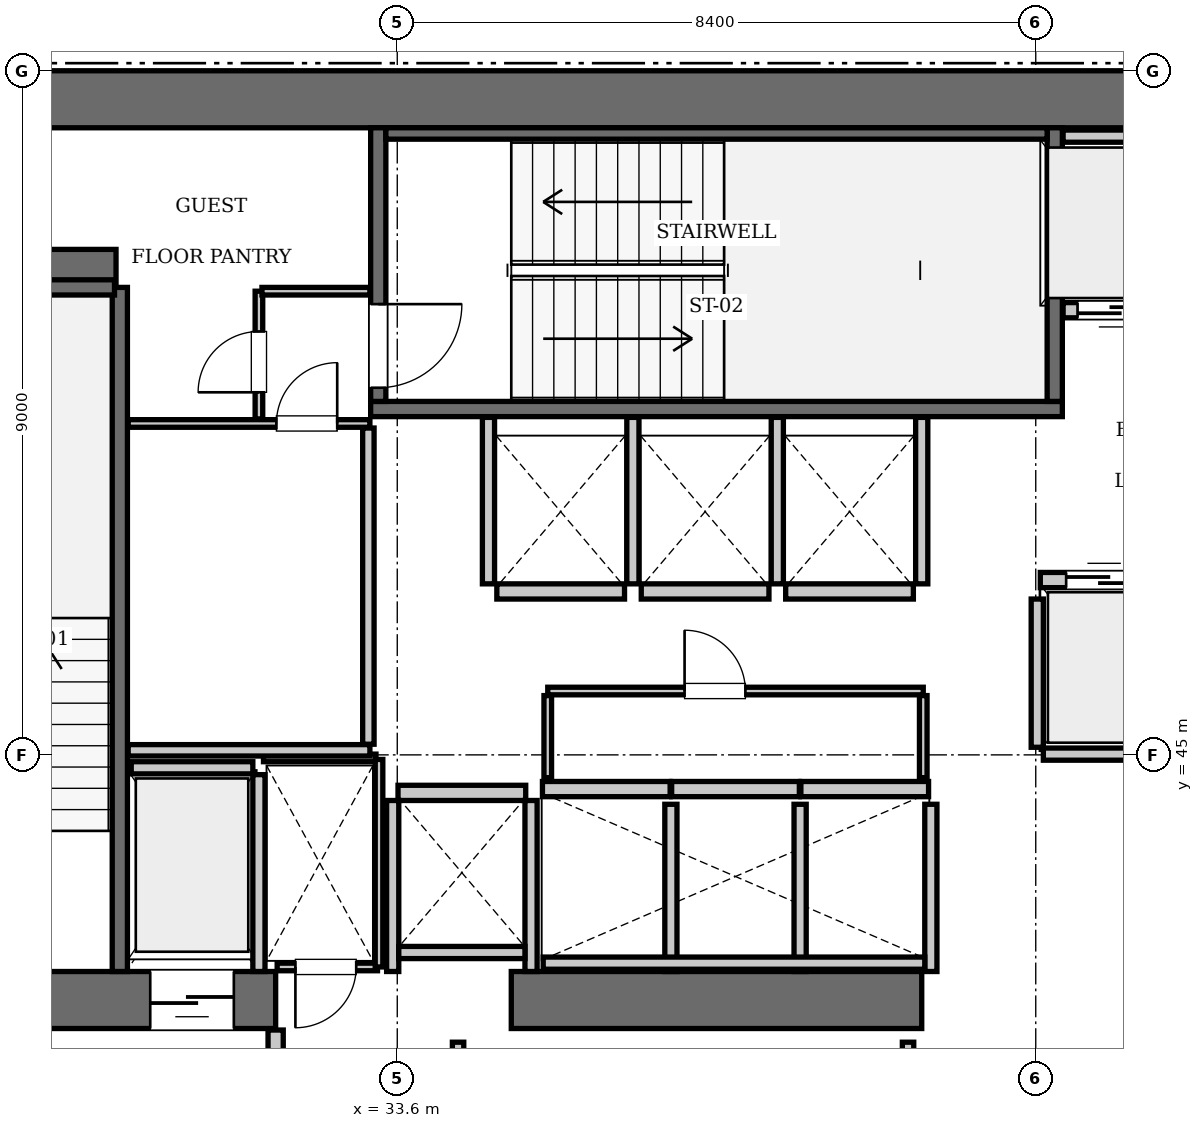
"""IFC4 building model, lengths in metres.
Left out: names, types, materials, properties, quantities, classifications, styles, units other than length and angle.
Written with IfcOpenShell. Run it as: python <this file> out.ifc"""

import sys

from ifc_helpers import new_model, si_unit, direction, frame, frame_2d, origin, place, context, subcontext, project, spatial, rectangle, extrude, element, fill, save


model = new_model("IFC4")
c1 = context("Model", 3, precision=1e-05, world=origin(), true_north=direction((0.0, 1.0)))
c2 = subcontext(c1, "Body", "Model", "MODEL_VIEW")
j1 = project(units=[si_unit("LENGTHUNIT", "METRE"), si_unit("PLANEANGLEUNIT", "RADIAN")], contexts=[c1])
p1 = place(None, origin())
s1 = spatial("IfcSite", under=j1, at=p1, CompositionType="ELEMENT")
p2 = place(p1, origin())
s2 = spatial("IfcBuilding", under=s1, at=p2, CompositionType="ELEMENT")
p3 = place(p2, frame((0.0, 0.0, 150.5)))
s3 = spatial("IfcBuildingStorey", under=s2, at=p3, CompositionType="ELEMENT", Elevation=150.5)
p4 = place(p3, frame((25.2, 53.625, 0.0), z_axis=(0.0, 0.0, 1.0), x_axis=(1.0, 0.0, 0.0)))
e1 = element("IfcWall", 1, at=p4, inside=s3, PredefinedType="SHEAR", context=c2, shape_type="SweptSolid", body=[
    extrude(rectangle(XDim=25.2, YDim=0.75, at=frame_2d((12.6, 0.0))), origin(), (0.0, 0.0, 1.0), 3.85),
])
p5 = place(p3, frame((25.2, 41.775, 0.0), z_axis=(0.0, 0.0, 1.0), x_axis=(1.0, 0.0, 0.0)))
e2 = element("IfcWall", 2, at=p5, inside=s3, PredefinedType="SHEAR", context=c2, shape_type="SweptSolid", body=[
    extrude(rectangle(XDim=6.8, YDim=0.75, at=frame_2d((3.4, 0.0))), origin(), (0.0, 0.0, 1.0), 3.85),
])
p6 = place(p5, frame((1.65, 0.0, 0.0)))
e3 = element("IfcOpeningElement", 3, at=p6, cuts=e2, PredefinedType="OPENING", context=c2, shape_type="SweptSolid", body=[
    extrude(rectangle(XDim=1.15, YDim=2.15, at=frame_2d((0.575, 1.075))), frame((0.0, 0.385, 0.0), z_axis=(0.0, -1.0, 0.0), x_axis=(1.0, 0.0, 0.0)), (0.0, 0.0, 1.0), 0.77),
])
p7 = place(p5, frame((5.15, 0.0, 0.0)))
e4 = element("IfcOpeningElement", 4, at=p7, cuts=e2, PredefinedType="OPENING", context=c2, shape_type="SweptSolid", body=[
    extrude(rectangle(XDim=1.1, YDim=2.2, at=frame_2d((0.55, 1.1))), frame((0.0, 0.385, 0.0), z_axis=(0.0, -1.0, 0.0), x_axis=(1.0, 0.0, 0.0)), (0.0, 0.0, 1.0), 0.77),
])
p8 = place(p3, frame((35.1, 41.775, 0.0), z_axis=(0.0, 0.0, 1.0), x_axis=(1.0, 0.0, 0.0)))
e5 = element("IfcWall", 5, at=p8, inside=s3, PredefinedType="SHEAR", context=c2, shape_type="SweptSolid", body=[
    extrude(rectangle(XDim=5.4, YDim=0.75, at=frame_2d((2.7, 0.0))), origin(), (0.0, 0.0, 1.0), 3.85),
])
p9 = place(p3, frame((25.95, 51.4, 0.0), z_axis=(0.0, 0.0, 1.0), x_axis=(1.0, 0.0, 0.0)))
e6 = element("IfcWall", 6, at=p9, inside=s3, PredefinedType="SHEAR", context=c2, shape_type="SweptSolid", body=[
    extrude(rectangle(XDim=3.95, YDim=0.5, at=frame_2d((1.975, 0.0))), origin(), (0.0, 0.0, 1.0), 3.85),
])
p10 = place(p3, frame((29.95, 42.15, 0.0), z_axis=(0.0, 0.0, 1.0), x_axis=(0.0, 1.0, 0.0)))
e7 = element("IfcWall", 7, at=p10, inside=s3, PredefinedType="SOLIDWALL", context=c2, shape_type="SweptSolid", body=[
    extrude(rectangle(XDim=9.0, YDim=0.2, at=frame_2d((4.5, 0.0))), origin(), (0.0, 0.0, 1.0), 3.61),
])
p11 = place(p3, frame((26.38, 51.15, 0.0), z_axis=(0.0, 0.0, 1.0), x_axis=(1.0, 0.0, 0.0)))
e8 = element("IfcWall", 8, at=p11, inside=s3, PredefinedType="SOLIDWALL", context=c2, shape_type="SweptSolid", body=[
    extrude(rectangle(XDim=3.5, YDim=0.2, at=frame_2d((1.75, 0.0))), origin(), (0.0, 0.0, 1.0), 3.61),
])
p12 = place(p3, frame((33.25, 49.55, 0.0), z_axis=(0.0, 0.0, 1.0), x_axis=(1.0, 0.0, 0.0)))
e9 = element("IfcWall", 9, at=p12, inside=s3, PredefinedType="SOLIDWALL", context=c2, shape_type="SweptSolid", body=[
    extrude(rectangle(XDim=9.1, YDim=0.2, at=frame_2d((4.55, 0.0))), origin(), (0.0, 0.0, 1.0), 3.61),
])
p13 = place(p3, frame((42.25, 49.65, 0.0), z_axis=(0.0, 0.0, 1.0), x_axis=(0.0, 1.0, 0.0)))
e10 = element("IfcWall", 10, at=p13, inside=s3, PredefinedType="SOLIDWALL", context=c2, shape_type="SweptSolid", body=[
    extrude(rectangle(XDim=3.6, YDim=0.2, at=frame_2d((1.8, 0.0))), origin(), (0.0, 0.0, 1.0), 3.61),
])
p14 = place(p3, frame((33.35, 49.65, 0.0), z_axis=(0.0, 0.0, 1.0), x_axis=(0.0, 1.0, 0.0)))
e11 = element("IfcWall", 11, at=p14, inside=s3, PredefinedType="SOLIDWALL", context=c2, shape_type="SweptSolid", body=[
    extrude(rectangle(XDim=3.6, YDim=0.2, at=frame_2d((1.8, 0.0))), origin(), (0.0, 0.0, 1.0), 3.61),
])
p15 = place(p14, frame((0.18, 0.0, 0.0)))
e12 = element("IfcOpeningElement", 12, at=p15, cuts=e11, PredefinedType="OPENING", context=c2, shape_type="SweptSolid", body=[
    extrude(rectangle(XDim=1.1, YDim=2.15, at=frame_2d((0.55, 1.075))), frame((0.0, 0.11, 0.0), z_axis=(0.0, -1.0, 0.0), x_axis=(1.0, 0.0, 0.0)), (0.0, 0.0, 1.0), 0.22),
])
p16 = place(p3, frame((33.45, 53.175, 0.0), z_axis=(0.0, 0.0, 1.0), x_axis=(1.0, 0.0, 0.0)))
e13 = element("IfcWall", 13, at=p16, inside=s3, PredefinedType="SOLIDWALL", context=c2, shape_type="SweptSolid", body=[
    extrude(rectangle(XDim=8.7, YDim=0.15, at=frame_2d((4.35, 0.0))), origin(), (0.0, 0.0, 1.0), 3.61),
])
p17 = place(p3, frame((42.06, 47.3, 0.0), z_axis=(0.0, 0.0, 1.0), x_axis=(1.0, 0.0, 0.0)))
e14 = element("IfcWall", 14, at=p17, inside=s3, PredefinedType="SOLIDWALL", context=c2, shape_type="SweptSolid", body=[
    extrude(rectangle(XDim=1.68, YDim=0.2, at=frame_2d((0.84, 0.0))), origin(), (0.0, 0.0, 1.0), 3.61),
])
p18 = place(p17, frame((0.34, 0.0, 0.0)))
e15 = element("IfcOpeningElement", 15, at=p18, cuts=e14, PredefinedType="OPENING", context=c2, shape_type="SweptSolid", body=[
    extrude(rectangle(XDim=1.0, YDim=2.15, at=frame_2d((0.5, 1.075))), frame((0.0, 0.11, 0.0), z_axis=(0.0, -1.0, 0.0), x_axis=(1.0, 0.0, 0.0)), (0.0, 0.0, 1.0), 0.22),
])
p19 = place(p3, frame((42.36, 50.85, 0.0), z_axis=(0.0, 0.0, 1.0), x_axis=(1.0, 0.0, 0.0)))
e16 = element("IfcWall", 16, at=p19, inside=s3, PredefinedType="SOLIDWALL", context=c2, shape_type="SweptSolid", body=[
    extrude(rectangle(XDim=1.38, YDim=0.2, at=frame_2d((0.69, 0.0))), origin(), (0.0, 0.0, 1.0), 3.61),
])
p20 = place(p19, frame((0.19, 0.0, 0.0)))
e17 = element("IfcOpeningElement", 17, at=p20, cuts=e16, PredefinedType="OPENING", context=c2, shape_type="SweptSolid", body=[
    extrude(rectangle(XDim=1.0, YDim=2.15, at=frame_2d((0.5, 1.075))), frame((0.0, 0.11, 0.0), z_axis=(0.0, -1.0, 0.0), x_axis=(1.0, 0.0, 0.0)), (0.0, 0.0, 1.0), 0.22),
])
for number, where, z_axis, x_axis in (
    (18, (35.51, 44.55, 0.0), (0.0, 0.0, 1.0), (1.0, 0.0, 0.0)),
    (19, (37.21, 44.55, 0.0), (0.0, 0.0, 1.0), (1.0, 0.0, 0.0)),
):
    element("IfcWall", number, at=place(p3, frame(where, z_axis=z_axis, x_axis=x_axis)), inside=s3, PredefinedType="SOLIDWALL", context=c2, shape_type="SweptSolid", body=[
        extrude(rectangle(XDim=1.68, YDim=0.2, at=frame_2d((0.84, 0.0))), origin(), (0.0, 0.0, 1.0), 3.61),
    ])
for number, where, z_axis, x_axis in (
    (20, (38.91, 44.55, 0.0), (0.0, 0.0, 1.0), (1.0, 0.0, 0.0)),
    (21, (34.91, 47.15, 0.0), (0.0, 0.0, 1.0), (1.0, 0.0, 0.0)),
):
    element("IfcWall", number, at=place(p3, frame(where, z_axis=z_axis, x_axis=x_axis)), inside=s3, PredefinedType="SOLIDWALL", context=c2, shape_type="SweptSolid", body=[
        extrude(rectangle(XDim=1.68, YDim=0.2, at=frame_2d((0.84, 0.0))), origin(), (0.0, 0.0, 1.0), 3.61),
    ])
for number, where, z_axis, x_axis in (
    (22, (36.81, 47.15, 0.0), (0.0, 0.0, 1.0), (1.0, 0.0, 0.0)),
    (23, (38.71, 47.15, 0.0), (0.0, 0.0, 1.0), (1.0, 0.0, 0.0)),
    (24, (33.61, 44.5, 0.0), (0.0, 0.0, 1.0), (1.0, 0.0, 0.0)),
):
    element("IfcWall", number, at=place(p3, frame(where, z_axis=z_axis, x_axis=x_axis)), inside=s3, PredefinedType="SOLIDWALL", context=c2, shape_type="SweptSolid", body=[
        extrude(rectangle(XDim=1.68, YDim=0.2, at=frame_2d((0.84, 0.0))), origin(), (0.0, 0.0, 1.0), 3.61),
    ])
p21 = place(p3, frame((30.1, 44.83, 0.0), z_axis=(0.0, 0.0, 1.0), x_axis=(1.0, 0.0, 0.0)))
e25 = element("IfcWall", 25, at=p21, inside=s3, PredefinedType="SOLIDWALL", context=c2, shape_type="SweptSolid", body=[
    extrude(rectangle(XDim=1.6, YDim=0.16, at=frame_2d((0.8, 0.0))), origin(), (0.0, 0.0, 1.0), 3.61),
])
p22 = place(p3, frame((31.78, 42.15, 0.0), z_axis=(0.0, 0.0, 1.0), x_axis=(0.0, 1.0, 0.0)))
e26 = element("IfcWall", 26, at=p22, inside=s3, PredefinedType="SOLIDWALL", context=c2, shape_type="SweptSolid", body=[
    extrude(rectangle(XDim=2.59, YDim=0.16, at=frame_2d((1.295, 0.0))), origin(), (0.0, 0.0, 1.0), 3.61),
])
p23 = place(p3, frame((42.02, 45.1, 0.0), z_axis=(0.0, 0.0, 1.0), x_axis=(0.0, 1.0, 0.0)))
e27 = element("IfcWall", 27, at=p23, inside=s3, PredefinedType="SOLIDWALL", context=c2, shape_type="SweptSolid", body=[
    extrude(rectangle(XDim=1.95, YDim=0.16, at=frame_2d((0.975, 0.0))), origin(), (0.0, 0.0, 1.0), 3.61),
])
p24 = place(p3, frame((42.1, 45.01, 0.0), z_axis=(0.0, 0.0, 1.0), x_axis=(1.0, 0.0, 0.0)))
e28 = element("IfcWall", 28, at=p24, inside=s3, PredefinedType="SOLIDWALL", context=c2, shape_type="SweptSolid", body=[
    extrude(rectangle(XDim=3.45, YDim=0.16, at=frame_2d((1.725, 0.0))), origin(), (0.0, 0.0, 1.0), 3.61),
])
p25 = place(p3, frame((42.36, 53.14, 0.0), z_axis=(0.0, 0.0, 1.0), x_axis=(1.0, 0.0, 0.0)))
e29 = element("IfcWall", 29, at=p25, inside=s3, PredefinedType="SOLIDWALL", context=c2, shape_type="SweptSolid", body=[
    extrude(rectangle(XDim=3.14, YDim=0.16, at=frame_2d((1.57, 0.0))), origin(), (0.0, 0.0, 1.0), 3.61),
])
for number, where, z_axis, x_axis in (
    (30, (37.2, 42.15, 0.0), (0.0, 0.0, 1.0), (0.0, 1.0, 0.0)),
    (31, (38.9, 42.15, 0.0), (0.0, 0.0, 1.0), (0.0, 1.0, 0.0)),
    (32, (40.62, 42.15, 0.0), (0.0, 0.0, 1.0), (0.0, 1.0, 0.0)),
):
    element("IfcWall", number, at=place(p3, frame(where, z_axis=z_axis, x_axis=x_axis)), inside=s3, PredefinedType="SOLIDWALL", context=c2, shape_type="SweptSolid", body=[
        extrude(rectangle(XDim=2.2, YDim=0.16, at=frame_2d((1.1, 0.0))), origin(), (0.0, 0.0, 1.0), 3.61),
    ])
p26 = place(p3, frame((35.52, 42.26, 0.0), z_axis=(0.0, 0.0, 1.0), x_axis=(1.0, 0.0, 0.0)))
e33 = element("IfcWall", 33, at=p26, inside=s3, PredefinedType="SOLIDWALL", context=c2, shape_type="SweptSolid", body=[
    extrude(rectangle(XDim=5.02, YDim=0.16, at=frame_2d((2.51, 0.0))), origin(), (0.0, 0.0, 1.0), 3.61),
])
for number, where, z_axis, x_axis in (
    (34, (34.8, 47.25, 0.0), (0.0, 0.0, 1.0), (0.0, 1.0, 0.0)),
    (35, (36.7, 47.25, 0.0), (0.0, 0.0, 1.0), (0.0, 1.0, 0.0)),
    (36, (38.6, 47.25, 0.0), (0.0, 0.0, 1.0), (0.0, 1.0, 0.0)),
    (37, (40.5, 47.25, 0.0), (0.0, 0.0, 1.0), (0.0, 1.0, 0.0)),
):
    element("IfcWall", number, at=place(p3, frame(where, z_axis=z_axis, x_axis=x_axis)), inside=s3, PredefinedType="SOLIDWALL", context=c2, shape_type="SweptSolid", body=[
        extrude(rectangle(XDim=2.19, YDim=0.16, at=frame_2d((1.095, 0.0))), origin(), (0.0, 0.0, 1.0), 3.61),
    ])
for number, where, z_axis, x_axis in (
    (38, (33.54, 42.15, 0.0), (0.0, 0.0, 1.0), (0.0, 1.0, 0.0)),
    (39, (35.36, 42.15, 0.0), (0.0, 0.0, 1.0), (0.0, 1.0, 0.0)),
):
    element("IfcWall", number, at=place(p3, frame(where, z_axis=z_axis, x_axis=x_axis)), inside=s3, PredefinedType="SOLIDWALL", context=c2, shape_type="SweptSolid", body=[
        extrude(rectangle(XDim=2.25, YDim=0.16, at=frame_2d((1.125, 0.0))), origin(), (0.0, 0.0, 1.0), 3.61),
    ])
p27 = place(p3, frame((33.62, 42.4, 0.0), z_axis=(0.0, 0.0, 1.0), x_axis=(1.0, 0.0, 0.0)))
e40 = element("IfcWall", 40, at=p27, inside=s3, PredefinedType="SOLIDWALL", context=c2, shape_type="SweptSolid", body=[
    extrude(rectangle(XDim=1.66, YDim=0.16, at=frame_2d((0.83, 0.0))), origin(), (0.0, 0.0, 1.0), 3.61),
])
p28 = place(p3, frame((32.0, 38.31, 0.0), z_axis=(0.0, 0.0, 1.0), x_axis=(0.0, 1.0, 0.0)))
e41 = element("IfcWall", 41, at=p28, inside=s3, PredefinedType="PARTITIONING", context=c2, shape_type="SweptSolid", body=[
    extrude(rectangle(XDim=3.07, YDim=0.2, at=frame_2d((1.535, 0.0))), origin(), (0.0, 0.0, 1.0), 3.61),
])
p29 = place(p3, frame((32.02, 42.21, 0.0), z_axis=(0.0, 0.0, 1.0), x_axis=(1.0, 0.0, 0.0)))
e42 = element("IfcWall", 42, at=p29, inside=s3, PredefinedType="PARTITIONING", context=c2, shape_type="SweptSolid", body=[
    extrude(rectangle(XDim=1.32, YDim=0.1, at=frame_2d((0.66, 0.0))), origin(), (0.0, 0.0, 1.0), 3.61),
])
p30 = place(p29, frame((0.24, 0.0, 0.0)))
e43 = element("IfcOpeningElement", 43, at=p30, cuts=e42, PredefinedType="OPENING", context=c2, shape_type="SweptSolid", body=[
    extrude(rectangle(XDim=0.8, YDim=2.05, at=frame_2d((0.4, 1.025))), frame((0.0, 0.06, 0.0), z_axis=(0.0, -1.0, 0.0), x_axis=(1.0, 0.0, 0.0)), (0.0, 0.0, 1.0), 0.12),
])
p31 = place(p3, frame((31.84, 44.96, 0.0), z_axis=(0.0, 0.0, 1.0), x_axis=(1.0, 0.0, 0.0)))
e44 = element("IfcWall", 44, at=p31, inside=s3, PredefinedType="PARTITIONING", context=c2, shape_type="SweptSolid", body=[
    extrude(rectangle(XDim=1.48, YDim=0.1, at=frame_2d((0.74, 0.0))), origin(), (0.0, 0.0, 1.0), 3.61),
])
p32 = place(p3, frame((33.36, 42.21, 0.0), z_axis=(0.0, 0.0, 1.0), x_axis=(0.0, 1.0, 0.0)))
e45 = element("IfcWall", 45, at=p32, inside=s3, PredefinedType="PARTITIONING", context=c2, shape_type="SweptSolid", body=[
    extrude(rectangle(XDim=2.73, YDim=0.1, at=frame_2d((1.365, 0.0))), origin(), (0.0, 0.0, 1.0), 3.61),
])
p33 = place(p3, frame((35.58, 45.84, 0.0), z_axis=(0.0, 0.0, 1.0), x_axis=(1.0, 0.0, 0.0)))
e46 = element("IfcWall", 46, at=p33, inside=s3, PredefinedType="PARTITIONING", context=c2, shape_type="SweptSolid", body=[
    extrude(rectangle(XDim=4.94, YDim=0.1, at=frame_2d((2.47, 0.0))), origin(), (0.0, 0.0, 1.0), 3.61),
])
p34 = place(p33, frame((1.8, 0.0, 0.0)))
e47 = element("IfcOpeningElement", 47, at=p34, cuts=e46, PredefinedType="OPENING", context=c2, shape_type="SweptSolid", body=[
    extrude(rectangle(XDim=0.8, YDim=2.05, at=frame_2d((0.4, 1.025))), frame((0.0, 0.06, 0.0), z_axis=(0.0, -1.0, 0.0), x_axis=(1.0, 0.0, 0.0)), (0.0, 0.0, 1.0), 0.12),
])
for number, where, z_axis, x_axis in (
    (48, (35.58, 44.7, 0.0), (0.0, 0.0, 1.0), (0.0, 1.0, 0.0)),
    (49, (40.52, 44.7, 0.0), (0.0, 0.0, 1.0), (0.0, 1.0, 0.0)),
):
    element("IfcWall", number, at=place(p3, frame(where, z_axis=z_axis, x_axis=x_axis)), inside=s3, PredefinedType="PARTITIONING", context=c2, shape_type="SweptSolid", body=[
        extrude(rectangle(XDim=1.08, YDim=0.1, at=frame_2d((0.54, 0.0))), origin(), (0.0, 0.0, 1.0), 3.61),
    ])
p35 = place(p3, frame((30.06, 45.06, 0.0), z_axis=(0.0, 0.0, 1.0), x_axis=(1.0, 0.0, 0.0)))
e50 = element("IfcWall", 50, at=p35, inside=s3, PredefinedType="PARTITIONING", context=c2, shape_type="SweptSolid", body=[
    extrude(rectangle(XDim=3.18, YDim=0.15, at=frame_2d((1.59, 0.0))), origin(), (0.0, 0.0, 1.0), 3.61),
])
p36 = place(p3, frame((33.22, 45.14, 0.0), z_axis=(0.0, 0.0, 1.0), x_axis=(0.0, 1.0, 0.0)))
e51 = element("IfcWall", 51, at=p36, inside=s3, PredefinedType="PARTITIONING", context=c2, shape_type="SweptSolid", body=[
    extrude(rectangle(XDim=4.16, YDim=0.15, at=frame_2d((2.08, 0.0))), origin(), (0.0, 0.0, 1.0), 3.61),
])
p37 = place(p3, frame((30.06, 49.36, 0.0), z_axis=(0.0, 0.0, 1.0), x_axis=(1.0, 0.0, 0.0)))
e52 = element("IfcWall", 52, at=p37, inside=s3, PredefinedType="PARTITIONING", context=c2, shape_type="SweptSolid", body=[
    extrude(rectangle(XDim=3.18, YDim=0.1, at=frame_2d((1.59, 0.0))), origin(), (0.0, 0.0, 1.0), 3.61),
])
p38 = place(p37, frame((1.95, 0.0, 0.0)))
e53 = element("IfcOpeningElement", 53, at=p38, cuts=e52, PredefinedType="OPENING", context=c2, shape_type="SweptSolid", body=[
    extrude(rectangle(XDim=0.8, YDim=2.05, at=frame_2d((0.4, 1.025))), frame((0.0, 0.06, 0.0), z_axis=(0.0, -1.0, 0.0), x_axis=(1.0, 0.0, 0.0)), (0.0, 0.0, 1.0), 0.12),
])
p39 = place(p3, frame((31.78, 49.42, 0.0), z_axis=(0.0, 0.0, 1.0), x_axis=(0.0, 1.0, 0.0)))
e54 = element("IfcWall", 54, at=p39, inside=s3, PredefinedType="PARTITIONING", context=c2, shape_type="SweptSolid", body=[
    extrude(rectangle(XDim=1.68, YDim=0.1, at=frame_2d((0.84, 0.0))), origin(), (0.0, 0.0, 1.0), 3.61),
])
p40 = place(p39, frame((0.35, 0.0, 0.0)))
e55 = element("IfcOpeningElement", 55, at=p40, cuts=e54, PredefinedType="OPENING", context=c2, shape_type="SweptSolid", body=[
    extrude(rectangle(XDim=0.8, YDim=2.05, at=frame_2d((0.4, 1.025))), frame((0.0, 0.06, 0.0), z_axis=(0.0, -1.0, 0.0), x_axis=(1.0, 0.0, 0.0)), (0.0, 0.0, 1.0), 0.12),
])
p41 = place(p3, frame((31.82, 51.1, 0.0), z_axis=(0.0, 0.0, 1.0), x_axis=(1.0, 0.0, 0.0)))
e56 = element("IfcWall", 56, at=p41, inside=s3, PredefinedType="PARTITIONING", context=c2, shape_type="SweptSolid", body=[
    extrude(rectangle(XDim=1.42, YDim=0.1, at=frame_2d((0.71, 0.0))), origin(), (0.0, 0.0, 1.0), 3.61),
])
for number, where, z_axis, x_axis in (
    (57, (34.4, 38.38, 0.0), (0.0, 0.0, 1.0), (0.0, 1.0, 0.0)),
    (58, (40.32, 38.38, 0.0), (0.0, 0.0, 1.0), (0.0, 1.0, 0.0)),
):
    element("IfcWall", number, at=place(p3, frame(where, z_axis=z_axis, x_axis=x_axis)), inside=s3, PredefinedType="PARTITIONING", context=c2, shape_type="SweptSolid", body=[
        extrude(rectangle(XDim=2.84, YDim=0.15, at=frame_2d((1.42, 0.0))), origin(), (0.0, 0.0, 1.0), 3.61),
    ])
p42 = place(p15, frame((1.1, 0.0, 0.0), z_axis=(0.0, 0.0, 1.0), x_axis=(-1.0, 0.0, 0.0)))
e59 = element("IfcDoor", 59, at=p42, inside=s3, OperationType="SINGLE_SWING_LEFT", PredefinedType="DOOR", context=c2, shape_type="SweptSolid", body=[
    extrude(rectangle(XDim=1.1, YDim=2.15, at=frame_2d((0.55, 1.075))), frame((0.0, 0.025, 0.0), z_axis=(0.0, -1.0, 0.0), x_axis=(1.0, 0.0, 0.0)), (0.0, 0.0, 1.0), 0.05),
])
fill(e12, e59)
p43 = place(p18, origin())
e60 = element("IfcDoor", 60, at=p43, inside=s3, OperationType="SLIDING_TO_LEFT", PredefinedType="DOOR", context=c2, shape_type="SweptSolid", body=[
    extrude(rectangle(XDim=1.0, YDim=2.15, at=frame_2d((0.5, 1.075))), frame((0.0, 0.025, 0.0), z_axis=(0.0, -1.0, 0.0), x_axis=(1.0, 0.0, 0.0)), (0.0, 0.0, 1.0), 0.05),
])
fill(e15, e60)
p44 = place(p20, frame((1.0, 0.0, 0.0), z_axis=(0.0, 0.0, 1.0), x_axis=(-1.0, 0.0, 0.0)))
e61 = element("IfcDoor", 61, at=p44, inside=s3, OperationType="SLIDING_TO_LEFT", PredefinedType="DOOR", context=c2, shape_type="SweptSolid", body=[
    extrude(rectangle(XDim=1.0, YDim=2.15, at=frame_2d((0.5, 1.075))), frame((0.0, 0.025, 0.0), z_axis=(0.0, -1.0, 0.0), x_axis=(1.0, 0.0, 0.0)), (0.0, 0.0, 1.0), 0.05),
])
fill(e17, e61)
p45 = place(p7, frame((1.1, 0.0, 0.0), z_axis=(0.0, 0.0, 1.0), x_axis=(-1.0, 0.0, 0.0)))
e62 = element("IfcDoor", 62, at=p45, inside=s3, OperationType="SLIDING_TO_LEFT", PredefinedType="DOOR", context=c2, shape_type="SweptSolid", body=[
    extrude(rectangle(XDim=1.1, YDim=2.2, at=frame_2d((0.55, 1.1))), frame((0.0, 0.025, 0.0), z_axis=(0.0, -1.0, 0.0), x_axis=(1.0, 0.0, 0.0)), (0.0, 0.0, 1.0), 0.05),
])
fill(e4, e62)
p46 = place(p30, frame((0.8, 0.0, 0.0), z_axis=(0.0, 0.0, 1.0), x_axis=(-1.0, 0.0, 0.0)))
e63 = element("IfcDoor", 63, at=p46, inside=s3, OperationType="SINGLE_SWING_RIGHT", PredefinedType="DOOR", context=c2, shape_type="SweptSolid", body=[
    extrude(rectangle(XDim=0.8, YDim=2.05, at=frame_2d((0.4, 1.025))), frame((0.0, 0.025, 0.0), z_axis=(0.0, -1.0, 0.0), x_axis=(1.0, 0.0, 0.0)), (0.0, 0.0, 1.0), 0.05),
])
fill(e43, e63)
p47 = place(p34, origin())
e64 = element("IfcDoor", 64, at=p47, inside=s3, OperationType="SINGLE_SWING_LEFT", PredefinedType="DOOR", context=c2, shape_type="SweptSolid", body=[
    extrude(rectangle(XDim=0.8, YDim=2.05, at=frame_2d((0.4, 1.025))), frame((0.0, 0.025, 0.0), z_axis=(0.0, -1.0, 0.0), x_axis=(1.0, 0.0, 0.0)), (0.0, 0.0, 1.0), 0.05),
])
fill(e47, e64)
p48 = place(p38, origin())
e65 = element("IfcDoor", 65, at=p48, inside=s3, OperationType="SINGLE_SWING_RIGHT", PredefinedType="DOOR", context=c2, shape_type="SweptSolid", body=[
    extrude(rectangle(XDim=0.8, YDim=2.05, at=frame_2d((0.4, 1.025))), frame((0.0, 0.025, 0.0), z_axis=(0.0, -1.0, 0.0), x_axis=(1.0, 0.0, 0.0)), (0.0, 0.0, 1.0), 0.05),
])
fill(e53, e65)
p49 = place(p40, origin())
e66 = element("IfcDoor", 66, at=p49, inside=s3, OperationType="SINGLE_SWING_LEFT", PredefinedType="DOOR", context=c2, shape_type="SweptSolid", body=[
    extrude(rectangle(XDim=0.8, YDim=2.05, at=frame_2d((0.4, 1.025))), frame((0.0, 0.025, 0.0), z_axis=(0.0, -1.0, 0.0), x_axis=(1.0, 0.0, 0.0)), (0.0, 0.0, 1.0), 0.05),
])
fill(e55, e66)
save(model, sys.argv[1])
